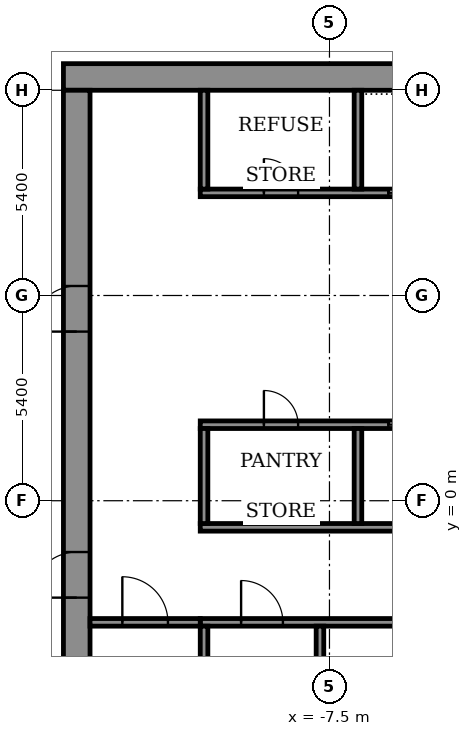
"""IFC4 building model, lengths in metres.
Left out: names, types, materials, properties, quantities, classifications, styles, units other than length and angle.
Written with IfcOpenShell. Run it as: python <this file> out.ifc"""

import sys

from ifc_helpers import new_model, si_unit, direction, frame, frame_2d, origin, place, context, subcontext, project, spatial, rectangle, extrude, element, fill, save


model = new_model("IFC4")
c1 = context("Model", 3, precision=1e-05, world=origin(), true_north=direction((0.0, 1.0)))
c2 = subcontext(c1, "Body", "Model", "MODEL_VIEW")
j1 = project(units=[si_unit("LENGTHUNIT", "METRE"), si_unit("PLANEANGLEUNIT", "RADIAN")], contexts=[c1])
p1 = place(None, origin())
s1 = spatial("IfcSite", under=j1, at=p1, CompositionType="ELEMENT")
p2 = place(p1, origin())
s2 = spatial("IfcBuilding", under=s1, at=p2, CompositionType="ELEMENT")
p3 = place(p2, frame((0.0, 0.0, 287.1)))
s3 = spatial("IfcBuildingStorey", under=s2, at=p3, CompositionType="ELEMENT", Elevation=287.1)
p4 = place(p3, frame((-14.5, 11.15, 0.0), z_axis=(0.0, 0.0, 1.0), x_axis=(1.0, 0.0, 0.0)))
e1 = element("IfcWall", 1, at=p4, inside=s3, PredefinedType="SHEAR", context=c2, shape_type="SweptSolid", body=[
    extrude(rectangle(XDim=29.0, YDim=0.7, at=frame_2d((14.5, 0.0))), origin(), (0.0, 0.0, 1.0), 3.6),
])
p5 = place(p3, frame((-14.15, -10.8, 0.0), z_axis=(0.0, 0.0, 1.0), x_axis=(0.0, 1.0, 0.0)))
e2 = element("IfcWall", 2, at=p5, inside=s3, PredefinedType="SHEAR", context=c2, shape_type="SweptSolid", body=[
    extrude(rectangle(XDim=21.6, YDim=0.7, at=frame_2d((10.8, 0.0))), origin(), (0.0, 0.0, 1.0), 3.6),
])
p6 = place(p5, frame((8.25, 0.0, 0.0)))
e3 = element("IfcOpeningElement", 3, at=p6, cuts=e2, PredefinedType="OPENING", context=c2, shape_type="SweptSolid", body=[
    extrude(rectangle(XDim=1.2, YDim=2.1, at=frame_2d((0.6, 1.05))), frame((0.0, 0.36, 0.0), z_axis=(0.0, -1.0, 0.0), x_axis=(1.0, 0.0, 0.0)), (0.0, 0.0, 1.0), 0.72),
])
p7 = place(p5, frame((15.25, 0.0, 0.0)))
e4 = element("IfcOpeningElement", 4, at=p7, cuts=e2, PredefinedType="OPENING", context=c2, shape_type="SweptSolid", body=[
    extrude(rectangle(XDim=1.2, YDim=2.1, at=frame_2d((0.6, 1.05))), frame((0.0, 0.36, 0.0), z_axis=(0.0, -1.0, 0.0), x_axis=(1.0, 0.0, 0.0)), (0.0, 0.0, 1.0), 0.72),
])
p8 = place(p3, frame((-10.9, -3.2, 0.0), z_axis=(0.0, 0.0, 1.0), x_axis=(1.0, 0.0, 0.0)))
e5 = element("IfcWall", 5, at=p8, inside=s3, PredefinedType="SHEAR", context=c2, shape_type="SweptSolid", body=[
    extrude(rectangle(XDim=21.8, YDim=0.2, at=frame_2d((10.9, 0.0))), origin(), (0.0, 0.0, 1.0), 3.05),
])
p9 = place(p8, frame((1.075, 0.0, 0.0)))
e6 = element("IfcOpeningElement", 6, at=p9, cuts=e5, PredefinedType="OPENING", context=c2, shape_type="SweptSolid", body=[
    extrude(rectangle(XDim=1.1, YDim=2.1, at=frame_2d((0.55, 1.05))), frame((0.0, 0.11, 0.0), z_axis=(0.0, -1.0, 0.0), x_axis=(1.0, 0.0, 0.0)), (0.0, 0.0, 1.0), 0.22),
])
p10 = place(p8, frame((10.325, 0.0, 0.0)))
e7 = element("IfcOpeningElement", 7, at=p10, cuts=e5, PredefinedType="OPENING", context=c2, shape_type="SweptSolid", body=[
    extrude(rectangle(XDim=1.1, YDim=2.1, at=frame_2d((0.55, 1.05))), frame((0.0, 0.11, 0.0), z_axis=(0.0, -1.0, 0.0), x_axis=(1.0, 0.0, 0.0)), (0.0, 0.0, 1.0), 0.22),
])
p11 = place(p8, frame((19.625, 0.0, 0.0)))
e8 = element("IfcOpeningElement", 8, at=p11, cuts=e5, PredefinedType="OPENING", context=c2, shape_type="SweptSolid", body=[
    extrude(rectangle(XDim=1.1, YDim=2.1, at=frame_2d((0.55, 1.05))), frame((0.0, 0.11, 0.0), z_axis=(0.0, -1.0, 0.0), x_axis=(1.0, 0.0, 0.0)), (0.0, 0.0, 1.0), 0.22),
])
p12 = place(p8, frame((5.7, 0.0, 0.0)))
e9 = element("IfcOpeningElement", 9, at=p12, cuts=e5, PredefinedType="OPENING", context=c2, shape_type="SweptSolid", body=[
    extrude(rectangle(XDim=1.1, YDim=2.1, at=frame_2d((0.55, 1.05))), frame((0.0, 0.11, 0.0), z_axis=(0.0, -1.0, 0.0), x_axis=(1.0, 0.0, 0.0)), (0.0, 0.0, 1.0), 0.22),
])
p13 = place(p8, frame((14.975, 0.0, 0.0)))
e10 = element("IfcOpeningElement", 10, at=p13, cuts=e5, PredefinedType="OPENING", context=c2, shape_type="SweptSolid", body=[
    extrude(rectangle(XDim=1.1, YDim=2.1, at=frame_2d((0.55, 1.05))), frame((0.0, 0.11, 0.0), z_axis=(0.0, -1.0, 0.0), x_axis=(1.0, 0.0, 0.0)), (0.0, 0.0, 1.0), 0.22),
])
p14 = place(p3, frame((-10.9, -0.7, 0.0), z_axis=(0.0, 0.0, 1.0), x_axis=(1.0, 0.0, 0.0)))
e11 = element("IfcWall", 11, at=p14, inside=s3, PredefinedType="SHEAR", context=c2, shape_type="SweptSolid", body=[
    extrude(rectangle(XDim=21.8, YDim=0.2, at=frame_2d((10.9, 0.0))), origin(), (0.0, 0.0, 1.0), 3.05),
])
p15 = place(p3, frame((-10.9, 2.0, 0.0), z_axis=(0.0, 0.0, 1.0), x_axis=(1.0, 0.0, 0.0)))
e12 = element("IfcWall", 12, at=p15, inside=s3, PredefinedType="SHEAR", context=c2, shape_type="SweptSolid", body=[
    extrude(rectangle(XDim=21.8, YDim=0.2, at=frame_2d((10.9, 0.0))), origin(), (0.0, 0.0, 1.0), 3.05),
])
p16 = place(p15, frame((4.95, 0.0, 0.0)))
e13 = element("IfcOpeningElement", 13, at=p16, cuts=e12, PredefinedType="OPENING", context=c2, shape_type="SweptSolid", body=[
    extrude(rectangle(XDim=1.1, YDim=2.1, at=frame_2d((0.55, 1.05))), frame((0.0, 0.11, 0.0), z_axis=(0.0, -1.0, 0.0), x_axis=(1.0, 0.0, 0.0)), (0.0, 0.0, 1.0), 0.22),
])
p17 = place(p15, frame((7.65, 0.0, 0.0)))
e14 = element("IfcOpeningElement", 14, at=p17, cuts=e12, PredefinedType="OPENING", context=c2, shape_type="SweptSolid", body=[
    extrude(rectangle(XDim=1.1, YDim=2.1, at=frame_2d((0.55, 1.05))), frame((0.0, 0.11, 0.0), z_axis=(0.0, -1.0, 0.0), x_axis=(1.0, 0.0, 0.0)), (0.0, 0.0, 1.0), 0.22),
])
p18 = place(p15, frame((10.35, 0.0, 0.0)))
e15 = element("IfcOpeningElement", 15, at=p18, cuts=e12, PredefinedType="OPENING", context=c2, shape_type="SweptSolid", body=[
    extrude(rectangle(XDim=1.1, YDim=2.1, at=frame_2d((0.55, 1.05))), frame((0.0, 0.11, 0.0), z_axis=(0.0, -1.0, 0.0), x_axis=(1.0, 0.0, 0.0)), (0.0, 0.0, 1.0), 0.22),
])
p19 = place(p15, frame((1.675, 0.0, 0.0)))
e16 = element("IfcOpeningElement", 16, at=p19, cuts=e12, PredefinedType="OPENING", context=c2, shape_type="SweptSolid", body=[
    extrude(rectangle(XDim=0.9, YDim=2.1, at=frame_2d((0.45, 1.05))), frame((0.0, 0.11, 0.0), z_axis=(0.0, -1.0, 0.0), x_axis=(1.0, 0.0, 0.0)), (0.0, 0.0, 1.0), 0.22),
])
p20 = place(p15, frame((16.525, 0.0, 0.0)))
e17 = element("IfcOpeningElement", 17, at=p20, cuts=e12, PredefinedType="OPENING", context=c2, shape_type="SweptSolid", body=[
    extrude(rectangle(XDim=0.9, YDim=2.1, at=frame_2d((0.45, 1.05))), frame((0.0, 0.11, 0.0), z_axis=(0.0, -1.0, 0.0), x_axis=(1.0, 0.0, 0.0)), (0.0, 0.0, 1.0), 0.22),
])
p21 = place(p3, frame((-10.9, 8.1, 0.0), z_axis=(0.0, 0.0, 1.0), x_axis=(1.0, 0.0, 0.0)))
e18 = element("IfcWall", 18, at=p21, inside=s3, PredefinedType="SHEAR", context=c2, shape_type="SweptSolid", body=[
    extrude(rectangle(XDim=21.8, YDim=0.2, at=frame_2d((10.9, 0.0))), origin(), (0.0, 0.0, 1.0), 3.05),
])
p22 = place(p21, frame((4.95, 0.0, 0.0)))
e19 = element("IfcOpeningElement", 19, at=p22, cuts=e18, PredefinedType="OPENING", context=c2, shape_type="SweptSolid", body=[
    extrude(rectangle(XDim=1.1, YDim=2.1, at=frame_2d((0.55, 1.05))), frame((0.0, 0.11, 0.0), z_axis=(0.0, -1.0, 0.0), x_axis=(1.0, 0.0, 0.0)), (0.0, 0.0, 1.0), 0.22),
])
p23 = place(p21, frame((7.65, 0.0, 0.0)))
e20 = element("IfcOpeningElement", 20, at=p23, cuts=e18, PredefinedType="OPENING", context=c2, shape_type="SweptSolid", body=[
    extrude(rectangle(XDim=1.1, YDim=2.1, at=frame_2d((0.55, 1.05))), frame((0.0, 0.11, 0.0), z_axis=(0.0, -1.0, 0.0), x_axis=(1.0, 0.0, 0.0)), (0.0, 0.0, 1.0), 0.22),
])
p24 = place(p21, frame((10.35, 0.0, 0.0)))
e21 = element("IfcOpeningElement", 21, at=p24, cuts=e18, PredefinedType="OPENING", context=c2, shape_type="SweptSolid", body=[
    extrude(rectangle(XDim=1.1, YDim=2.1, at=frame_2d((0.55, 1.05))), frame((0.0, 0.11, 0.0), z_axis=(0.0, -1.0, 0.0), x_axis=(1.0, 0.0, 0.0)), (0.0, 0.0, 1.0), 0.22),
])
p25 = place(p21, frame((1.675, 0.0, 0.0)))
e22 = element("IfcOpeningElement", 22, at=p25, cuts=e18, PredefinedType="OPENING", context=c2, shape_type="SweptSolid", body=[
    extrude(rectangle(XDim=0.9, YDim=2.1, at=frame_2d((0.45, 1.05))), frame((0.0, 0.11, 0.0), z_axis=(0.0, -1.0, 0.0), x_axis=(1.0, 0.0, 0.0)), (0.0, 0.0, 1.0), 0.22),
])
p26 = place(p21, frame((16.525, 0.0, 0.0)))
e23 = element("IfcOpeningElement", 23, at=p26, cuts=e18, PredefinedType="OPENING", context=c2, shape_type="SweptSolid", body=[
    extrude(rectangle(XDim=0.9, YDim=2.1, at=frame_2d((0.45, 1.05))), frame((0.0, 0.11, 0.0), z_axis=(0.0, -1.0, 0.0), x_axis=(1.0, 0.0, 0.0)), (0.0, 0.0, 1.0), 0.22),
])
for number, where, z_axis, x_axis in (
    (24, (-10.8, -10.8, 0.0), (0.0, 0.0, 1.0), (0.0, 1.0, 0.0)),
    (25, (-7.75, -10.8, 0.0), (0.0, 0.0, 1.0), (0.0, 1.0, 0.0)),
):
    element("IfcWall", number, at=place(p3, frame(where, z_axis=z_axis, x_axis=x_axis)), inside=s3, PredefinedType="SHEAR", context=c2, shape_type="SweptSolid", body=[
        extrude(rectangle(XDim=7.5, YDim=0.2, at=frame_2d((3.75, 0.0))), origin(), (0.0, 0.0, 1.0), 3.05),
    ])
p27 = place(p3, frame((-10.8, -0.6, 0.0), z_axis=(0.0, 0.0, 1.0), x_axis=(0.0, 1.0, 0.0)))
e26 = element("IfcWall", 26, at=p27, inside=s3, PredefinedType="STANDARD", context=c2, shape_type="SweptSolid", body=[
    extrude(rectangle(XDim=2.5, YDim=0.2, at=frame_2d((1.25, 0.0))), origin(), (0.0, 0.0, 1.0), 3.05),
])
p28 = place(p3, frame((-6.75, -0.6, 0.0), z_axis=(0.0, 0.0, 1.0), x_axis=(0.0, 1.0, 0.0)))
e27 = element("IfcWall", 27, at=p28, inside=s3, PredefinedType="SHEAR", context=c2, shape_type="SweptSolid", body=[
    extrude(rectangle(XDim=2.5, YDim=0.2, at=frame_2d((1.25, 0.0))), origin(), (0.0, 0.0, 1.0), 3.05),
])
p29 = place(p3, frame((-10.8, 8.2, 0.0), z_axis=(0.0, 0.0, 1.0), x_axis=(0.0, 1.0, 0.0)))
e28 = element("IfcWall", 28, at=p29, inside=s3, PredefinedType="STANDARD", context=c2, shape_type="SweptSolid", body=[
    extrude(rectangle(XDim=2.6, YDim=0.2, at=frame_2d((1.3, 0.0))), origin(), (0.0, 0.0, 1.0), 3.05),
])
p30 = place(p3, frame((-6.75, 8.2, 0.0), z_axis=(0.0, 0.0, 1.0), x_axis=(0.0, 1.0, 0.0)))
e29 = element("IfcWall", 29, at=p30, inside=s3, PredefinedType="SHEAR", context=c2, shape_type="SweptSolid", body=[
    extrude(rectangle(XDim=2.6, YDim=0.2, at=frame_2d((1.3, 0.0))), origin(), (0.0, 0.0, 1.0), 3.05),
])
p31 = place(p3, frame((-13.8, -3.2, 0.0), z_axis=(0.0, 0.0, 1.0), x_axis=(1.0, 0.0, 0.0)))
e30 = element("IfcWall", 30, at=p31, inside=s3, PredefinedType="STANDARD", context=c2, shape_type="SweptSolid", body=[
    extrude(rectangle(XDim=2.9, YDim=0.2, at=frame_2d((1.45, 0.0))), origin(), (0.0, 0.0, 1.0), 3.05),
])
p32 = place(p31, frame((0.85, 0.0, 0.0)))
e31 = element("IfcOpeningElement", 31, at=p32, cuts=e30, PredefinedType="OPENING", context=c2, shape_type="SweptSolid", body=[
    extrude(rectangle(XDim=1.2, YDim=2.1, at=frame_2d((0.6, 1.05))), frame((0.0, 0.11, 0.0), z_axis=(0.0, -1.0, 0.0), x_axis=(1.0, 0.0, 0.0)), (0.0, 0.0, 1.0), 0.22),
])
p33 = place(p6, origin())
e32 = element("IfcDoor", 32, at=p33, inside=s3, OperationType="DOUBLE_DOOR_SINGLE_SWING", PredefinedType="DOOR", context=c2, shape_type="SweptSolid", body=[
    extrude(rectangle(XDim=1.2, YDim=2.1, at=frame_2d((0.6, 1.05))), frame((0.0, 0.025, 0.0), z_axis=(0.0, -1.0, 0.0), x_axis=(1.0, 0.0, 0.0)), (0.0, 0.0, 1.0), 0.05),
])
fill(e3, e32)
p34 = place(p7, origin())
e33 = element("IfcDoor", 33, at=p34, inside=s3, OperationType="DOUBLE_DOOR_SINGLE_SWING", PredefinedType="DOOR", context=c2, shape_type="SweptSolid", body=[
    extrude(rectangle(XDim=1.2, YDim=2.1, at=frame_2d((0.6, 1.05))), frame((0.0, 0.025, 0.0), z_axis=(0.0, -1.0, 0.0), x_axis=(1.0, 0.0, 0.0)), (0.0, 0.0, 1.0), 0.05),
])
fill(e4, e33)
p35 = place(p16, origin())
e34 = element("IfcDoor", 34, at=p35, inside=s3, OperationType="SLIDING_TO_LEFT", PredefinedType="DOOR", context=c2, shape_type="SweptSolid", body=[
    extrude(rectangle(XDim=1.1, YDim=2.1, at=frame_2d((0.55, 1.05))), frame((0.0, 0.025, 0.0), z_axis=(0.0, -1.0, 0.0), x_axis=(1.0, 0.0, 0.0)), (0.0, 0.0, 1.0), 0.05),
])
fill(e13, e34)
p36 = place(p22, origin())
e35 = element("IfcDoor", 35, at=p36, inside=s3, OperationType="SLIDING_TO_LEFT", PredefinedType="DOOR", context=c2, shape_type="SweptSolid", body=[
    extrude(rectangle(XDim=1.1, YDim=2.1, at=frame_2d((0.55, 1.05))), frame((0.0, 0.025, 0.0), z_axis=(0.0, -1.0, 0.0), x_axis=(1.0, 0.0, 0.0)), (0.0, 0.0, 1.0), 0.05),
])
fill(e19, e35)
p37 = place(p19, origin())
e36 = element("IfcDoor", 36, at=p37, inside=s3, OperationType="SINGLE_SWING_RIGHT", PredefinedType="DOOR", context=c2, shape_type="SweptSolid", body=[
    extrude(rectangle(XDim=0.9, YDim=2.1, at=frame_2d((0.45, 1.05))), frame((0.0, 0.025, 0.0), z_axis=(0.0, -1.0, 0.0), x_axis=(1.0, 0.0, 0.0)), (0.0, 0.0, 1.0), 0.05),
])
fill(e16, e36)
p38 = place(p25, origin())
e37 = element("IfcDoor", 37, at=p38, inside=s3, OperationType="SINGLE_SWING_RIGHT", PredefinedType="DOOR", context=c2, shape_type="SweptSolid", body=[
    extrude(rectangle(XDim=0.9, YDim=2.1, at=frame_2d((0.45, 1.05))), frame((0.0, 0.025, 0.0), z_axis=(0.0, -1.0, 0.0), x_axis=(1.0, 0.0, 0.0)), (0.0, 0.0, 1.0), 0.05),
])
fill(e22, e37)
p39 = place(p9, origin())
e38 = element("IfcDoor", 38, at=p39, inside=s3, OperationType="SINGLE_SWING_RIGHT", PredefinedType="DOOR", context=c2, shape_type="SweptSolid", body=[
    extrude(rectangle(XDim=1.1, YDim=2.1, at=frame_2d((0.55, 1.05))), frame((0.0, 0.025, 0.0), z_axis=(0.0, -1.0, 0.0), x_axis=(1.0, 0.0, 0.0)), (0.0, 0.0, 1.0), 0.05),
])
fill(e6, e38)
p40 = place(p32, origin())
e39 = element("IfcDoor", 39, at=p40, inside=s3, OperationType="SINGLE_SWING_LEFT", PredefinedType="DOOR", context=c2, shape_type="SweptSolid", body=[
    extrude(rectangle(XDim=1.2, YDim=2.1, at=frame_2d((0.6, 1.05))), frame((0.0, 0.025, 0.0), z_axis=(0.0, -1.0, 0.0), x_axis=(1.0, 0.0, 0.0)), (0.0, 0.0, 1.0), 0.05),
])
fill(e31, e39)
save(model, sys.argv[1])
